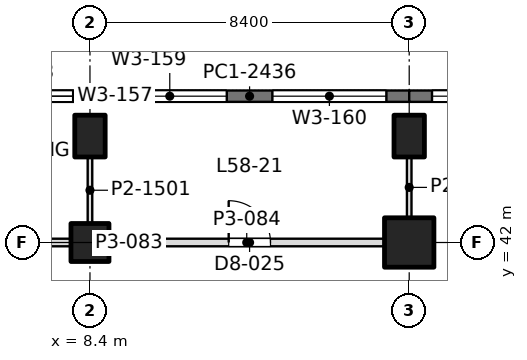
"""IFC4 building model, lengths in metres.
Left out: names, types, materials, properties, quantities, classifications, styles, units other than length and angle.
Written with IfcOpenShell. Run it as: python <this file> out.ifc"""

import sys

from ifc_helpers import new_model, si_unit, direction, frame, frame_2d, origin, origin_2d, place, context, subcontext, project, spatial, rectangle, extrude, element, fill, save


model = new_model("IFC4")
c1 = context("Model", 3, precision=1e-05, world=origin(), true_north=direction((0.0, 1.0)))
c2 = subcontext(c1, "Body", "Model", "MODEL_VIEW")
j1 = project(units=[si_unit("LENGTHUNIT", "METRE"), si_unit("PLANEANGLEUNIT", "RADIAN")], contexts=[c1])
p1 = place(None, origin())
s1 = spatial("IfcSite", under=j1, at=p1, CompositionType="ELEMENT")
p2 = place(p1, origin())
s2 = spatial("IfcBuilding", under=s1, at=p2, CompositionType="ELEMENT")
p3 = place(p2, frame((0.0, 0.0, 254.7)))
s3 = spatial("IfcBuildingStorey", under=s2, at=p3, CompositionType="ELEMENT", Elevation=254.7)
p4 = place(p3, frame((8.4, 42.0, 0.0), z_axis=(0.0, 0.0, 1.0), x_axis=(1.0, 0.0, 0.0)))
e1 = element("IfcColumn", 1, at=p4, inside=s3, PredefinedType="COLUMN", context=c2, shape_type="SweptSolid", body=[
    extrude(rectangle(XDim=1.0, YDim=1.0, at=origin_2d()), origin(), (0.0, 0.0, 1.0), 4.5),
])
p5 = place(p3, frame((8.4, 44.8, 0.0), z_axis=(0.0, 0.0, 1.0), x_axis=(1.0, 0.0, 0.0)))
e2 = element("IfcColumn", 2, at=p5, inside=s3, PredefinedType="COLUMN", context=c2, shape_type="SweptSolid", body=[
    extrude(rectangle(XDim=0.8, YDim=1.1, at=origin_2d()), origin(), (0.0, 0.0, 1.0), 4.5),
])
p6 = place(p3, frame((16.8, 42.0, 0.0), z_axis=(0.0, 0.0, 1.0), x_axis=(1.0, 0.0, 0.0)))
e3 = element("IfcColumn", 3, at=p6, inside=s3, PredefinedType="COLUMN", context=c2, shape_type="SweptSolid", body=[
    extrude(rectangle(XDim=1.3, YDim=1.3, at=origin_2d()), origin(), (0.0, 0.0, 1.0), 4.5),
])
p7 = place(p3, frame((16.8, 44.8, 0.0), z_axis=(0.0, 0.0, 1.0), x_axis=(1.0, 0.0, 0.0)))
e4 = element("IfcColumn", 4, at=p7, inside=s3, PredefinedType="COLUMN", context=c2, shape_type="SweptSolid", body=[
    extrude(rectangle(XDim=0.8, YDim=1.1, at=origin_2d()), origin(), (0.0, 0.0, 1.0), 4.5),
])
p8 = place(p3, frame((0.315, 45.85, 0.0), z_axis=(0.0, 0.0, 1.0), x_axis=(1.0, 0.0, 0.0)))
e5 = element("IfcWall", 5, at=p8, inside=s3, PredefinedType="SOLIDWALL", context=c2, shape_type="SweptSolid", body=[
    extrude(rectangle(XDim=8.085, YDim=0.3, at=frame_2d((4.042, 0.0))), origin(), (0.0, 0.0, 1.0), 4.35),
])
p9 = place(p8, frame((0.443, 0.0, 0.9)))
e6 = element("IfcOpeningElement", 6, at=p9, cuts=e5, PredefinedType="OPENING", context=c2, shape_type="SweptSolid", body=[
    extrude(rectangle(XDim=3.0, YDim=2.4, at=frame_2d((1.5, 1.2))), frame((0.0, 0.16, 0.0), z_axis=(0.0, -1.0, 0.0), x_axis=(1.0, 0.0, 0.0)), (0.0, 0.0, 1.0), 0.32),
])
p10 = place(p8, frame((4.643, 0.0, 0.9)))
e7 = element("IfcOpeningElement", 7, at=p10, cuts=e5, PredefinedType="OPENING", context=c2, shape_type="SweptSolid", body=[
    extrude(rectangle(XDim=3.0, YDim=2.4, at=frame_2d((1.5, 1.2))), frame((0.0, 0.16, 0.0), z_axis=(0.0, -1.0, 0.0), x_axis=(1.0, 0.0, 0.0)), (0.0, 0.0, 1.0), 0.32),
])
p11 = place(p3, frame((8.4, 45.85, 0.0), z_axis=(0.0, 0.0, 1.0), x_axis=(1.0, 0.0, 0.0)))
e8 = element("IfcWall", 8, at=p11, inside=s3, PredefinedType="SOLIDWALL", context=c2, shape_type="SweptSolid", body=[
    extrude(rectangle(XDim=8.4, YDim=0.3, at=frame_2d((4.2, 0.0))), origin(), (0.0, 0.0, 1.0), 4.35),
])
p12 = place(p11, frame((0.6, 0.0, 0.9)))
e9 = element("IfcOpeningElement", 9, at=p12, cuts=e8, PredefinedType="OPENING", context=c2, shape_type="SweptSolid", body=[
    extrude(rectangle(XDim=3.0, YDim=2.4, at=frame_2d((1.5, 1.2))), frame((0.0, 0.16, 0.0), z_axis=(0.0, -1.0, 0.0), x_axis=(1.0, 0.0, 0.0)), (0.0, 0.0, 1.0), 0.32),
])
p13 = place(p11, frame((4.8, 0.0, 0.9)))
e10 = element("IfcOpeningElement", 10, at=p13, cuts=e8, PredefinedType="OPENING", context=c2, shape_type="SweptSolid", body=[
    extrude(rectangle(XDim=3.0, YDim=2.4, at=frame_2d((1.5, 1.2))), frame((0.0, 0.16, 0.0), z_axis=(0.0, -1.0, 0.0), x_axis=(1.0, 0.0, 0.0)), (0.0, 0.0, 1.0), 0.32),
])
p14 = place(p3, frame((16.8, 45.85, 0.0), z_axis=(0.0, 0.0, 1.0), x_axis=(1.0, 0.0, 0.0)))
e11 = element("IfcWall", 11, at=p14, inside=s3, PredefinedType="SOLIDWALL", context=c2, shape_type="SweptSolid", body=[
    extrude(rectangle(XDim=8.4, YDim=0.3, at=frame_2d((4.2, 0.0))), origin(), (0.0, 0.0, 1.0), 4.35),
])
p15 = place(p14, frame((0.6, 0.0, 0.9)))
e12 = element("IfcOpeningElement", 12, at=p15, cuts=e11, PredefinedType="OPENING", context=c2, shape_type="SweptSolid", body=[
    extrude(rectangle(XDim=3.0, YDim=2.4, at=frame_2d((1.5, 1.2))), frame((0.0, 0.16, 0.0), z_axis=(0.0, -1.0, 0.0), x_axis=(1.0, 0.0, 0.0)), (0.0, 0.0, 1.0), 0.32),
])
p16 = place(p14, frame((4.8, 0.0, 0.9)))
e13 = element("IfcOpeningElement", 13, at=p16, cuts=e11, PredefinedType="OPENING", context=c2, shape_type="SweptSolid", body=[
    extrude(rectangle(XDim=3.0, YDim=2.4, at=frame_2d((1.5, 1.2))), frame((0.0, 0.16, 0.0), z_axis=(0.0, -1.0, 0.0), x_axis=(1.0, 0.0, 0.0)), (0.0, 0.0, 1.0), 0.32),
])
p17 = place(p3, frame((0.549, 42.0, 0.0), z_axis=(0.0, 0.0, 1.0), x_axis=(1.0, 0.0, 0.0)))
e14 = element("IfcWall", 14, at=p17, inside=s3, PredefinedType="PARTITIONING", context=c2, shape_type="SweptSolid", body=[
    extrude(rectangle(XDim=7.352, YDim=0.2, at=frame_2d((3.676, 0.0))), origin(), (0.0, 0.0, 1.0), 3.8),
])
p18 = place(p17, frame((2.651, 0.0, 0.0)))
e15 = element("IfcOpeningElement", 15, at=p18, cuts=e14, PredefinedType="OPENING", context=c2, shape_type="SweptSolid", body=[
    extrude(rectangle(XDim=1.1, YDim=2.4, at=frame_2d((0.55, 1.2))), frame((0.0, 0.11, 0.0), z_axis=(0.0, -1.0, 0.0), x_axis=(1.0, 0.0, 0.0)), (0.0, 0.0, 1.0), 0.22),
])
p19 = place(p3, frame((8.899, 42.0, 0.0), z_axis=(0.0, 0.0, 1.0), x_axis=(1.0, 0.0, 0.0)))
e16 = element("IfcWall", 16, at=p19, inside=s3, PredefinedType="PARTITIONING", context=c2, shape_type="SweptSolid", body=[
    extrude(rectangle(XDim=7.252, YDim=0.2, at=frame_2d((3.626, 0.0))), origin(), (0.0, 0.0, 1.0), 3.8),
])
p20 = place(p19, frame((3.151, 0.0, 0.0)))
e17 = element("IfcOpeningElement", 17, at=p20, cuts=e16, PredefinedType="OPENING", context=c2, shape_type="SweptSolid", body=[
    extrude(rectangle(XDim=1.1, YDim=2.4, at=frame_2d((0.55, 1.2))), frame((0.0, 0.11, 0.0), z_axis=(0.0, -1.0, 0.0), x_axis=(1.0, 0.0, 0.0)), (0.0, 0.0, 1.0), 0.22),
])
p21 = place(p3, frame((8.4, 42.499, 0.0), z_axis=(0.0, 0.0, 1.0), x_axis=(0.0, 1.0, 0.0)))
e18 = element("IfcWall", 18, at=p21, inside=s3, PredefinedType="PARTITIONING", context=c2, shape_type="SweptSolid", body=[
    extrude(rectangle(XDim=1.752, YDim=0.12, at=frame_2d((0.876, 0.0))), origin(), (0.0, 0.0, 1.0), 3.99),
])
p22 = place(p3, frame((16.8, 42.649, 0.0), z_axis=(0.0, 0.0, 1.0), x_axis=(0.0, 1.0, 0.0)))
e19 = element("IfcWall", 19, at=p22, inside=s3, PredefinedType="PARTITIONING", context=c2, shape_type="SweptSolid", body=[
    extrude(rectangle(XDim=1.602, YDim=0.12, at=frame_2d((0.801, 0.0))), origin(), (0.0, 0.0, 1.0), 3.99),
])
p23 = place(p10, origin())
e20 = element("IfcWindow", 20, at=p23, inside=s3, PartitioningType="SINGLE_PANEL", PredefinedType="WINDOW", context=c2, shape_type="SweptSolid", body=[
    extrude(rectangle(XDim=3.0, YDim=2.4, at=frame_2d((1.5, 1.2))), frame((0.0, 0.03, 0.0), z_axis=(0.0, -1.0, 0.0), x_axis=(1.0, 0.0, 0.0)), (0.0, 0.0, 1.0), 0.06),
])
fill(e7, e20)
p24 = place(p12, origin())
e21 = element("IfcWindow", 21, at=p24, inside=s3, PartitioningType="SINGLE_PANEL", PredefinedType="WINDOW", context=c2, shape_type="SweptSolid", body=[
    extrude(rectangle(XDim=3.0, YDim=2.4, at=frame_2d((1.5, 1.2))), frame((0.0, 0.03, 0.0), z_axis=(0.0, -1.0, 0.0), x_axis=(1.0, 0.0, 0.0)), (0.0, 0.0, 1.0), 0.06),
])
fill(e9, e21)
p25 = place(p13, origin())
e22 = element("IfcWindow", 22, at=p25, inside=s3, PartitioningType="SINGLE_PANEL", PredefinedType="WINDOW", context=c2, shape_type="SweptSolid", body=[
    extrude(rectangle(XDim=3.0, YDim=2.4, at=frame_2d((1.5, 1.2))), frame((0.0, 0.03, 0.0), z_axis=(0.0, -1.0, 0.0), x_axis=(1.0, 0.0, 0.0)), (0.0, 0.0, 1.0), 0.06),
])
fill(e10, e22)
p26 = place(p15, origin())
e23 = element("IfcWindow", 23, at=p26, inside=s3, PartitioningType="SINGLE_PANEL", PredefinedType="WINDOW", context=c2, shape_type="SweptSolid", body=[
    extrude(rectangle(XDim=3.0, YDim=2.4, at=frame_2d((1.5, 1.2))), frame((0.0, 0.03, 0.0), z_axis=(0.0, -1.0, 0.0), x_axis=(1.0, 0.0, 0.0)), (0.0, 0.0, 1.0), 0.06),
])
fill(e12, e23)
p27 = place(p20, origin())
e24 = element("IfcDoor", 24, at=p27, inside=s3, OperationType="SINGLE_SWING_LEFT", PredefinedType="DOOR", context=c2, shape_type="SweptSolid", body=[
    extrude(rectangle(XDim=1.1, YDim=2.4, at=frame_2d((0.55, 1.2))), frame((0.0, 0.025, 0.0), z_axis=(0.0, -1.0, 0.0), x_axis=(1.0, 0.0, 0.0)), (0.0, 0.0, 1.0), 0.05),
])
fill(e17, e24)
save(model, sys.argv[1])
